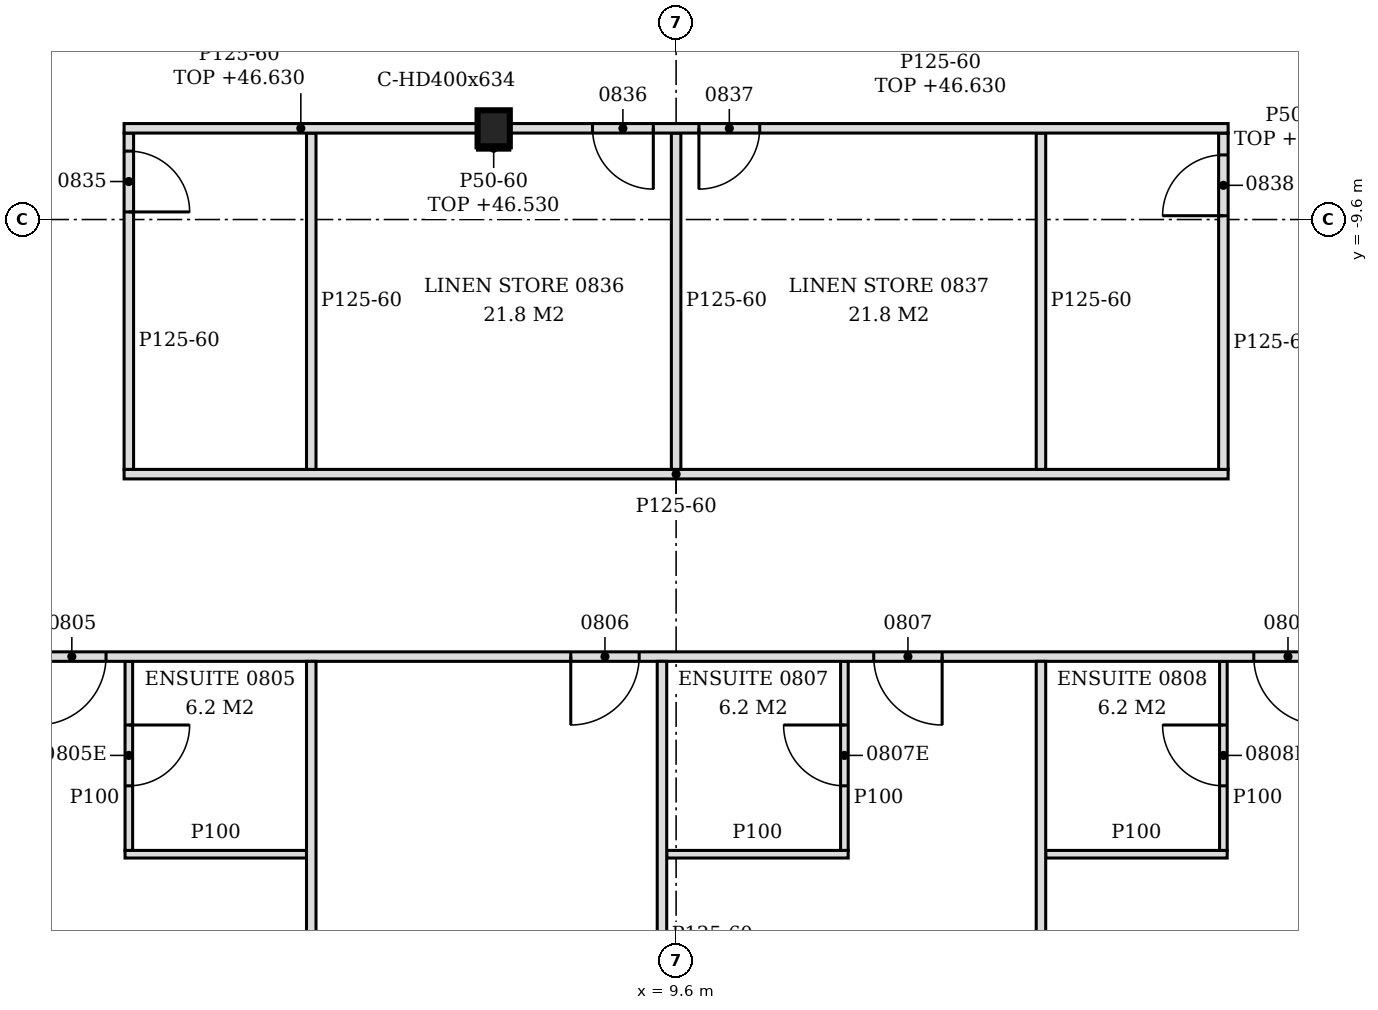
"""IFC4 building model, lengths in metres.
Left out: names, types, materials, properties, quantities, classifications, styles, units other than length and angle.
Written with IfcOpenShell. Run it as: python <this file> out.ifc"""

import sys

from ifc_helpers import new_model, si_unit, direction, frame, frame_2d, origin, origin_2d, place, context, subcontext, project, spatial, polyline, rectangle, i_section, outline, extrude, element, fill, save


model = new_model("IFC4")
c1 = context("Model", 3, precision=1e-05, world=origin(), true_north=direction((0.0, 1.0)))
c2 = subcontext(c1, "Body", "Model", "MODEL_VIEW")
j1 = project(units=[si_unit("LENGTHUNIT", "METRE"), si_unit("PLANEANGLEUNIT", "RADIAN")], contexts=[c1])
p1 = place(None, origin())
s1 = spatial("IfcSite", under=j1, at=p1, CompositionType="ELEMENT")
p2 = place(p1, origin())
s2 = spatial("IfcBuilding", under=s1, at=p2, CompositionType="ELEMENT")
p3 = place(p2, frame((0.0, 0.0, 43.8)))
s3 = spatial("IfcBuildingStorey", under=s2, at=p3, CompositionType="ELEMENT", Elevation=43.8)
p4 = place(p3, frame((7.2, -8.4, -0.15), z_axis=(0.0, 0.0, 1.0), x_axis=(1.0, 0.0, 0.0)))
e1 = element("IfcColumn", 1, at=p4, inside=s3, PredefinedType="COLUMN", context=c2, shape_type="SweptSolid", body=[
    extrude(i_section(OverallWidth=0.424, OverallDepth=0.474, WebThickness=0.048, FlangeThickness=0.077, FilletRadius=0.015, at=origin_2d()), origin(), (0.0, 0.0, 1.0), 3.6),
])
for number, where, z_axis, x_axis in (
    (2, (4.8, -23.65, 0.0), (0.0, 0.0, 1.0), (0.0, 1.0, 0.0)),
    (3, (14.4, -23.65, 0.0), (0.0, 0.0, 1.0), (0.0, 1.0, 0.0)),
):
    element("IfcWall", number, at=place(p3, frame(where, z_axis=z_axis, x_axis=x_axis)), inside=s3, PredefinedType="PARTITIONING", context=c2, shape_type="SweptSolid", body=[
        extrude(outline(polyline([(0.0, 0.0), (8.237, 0.0), (8.238, 3.45), (4.555, 3.45), (4.553, 2.88), (4.345, 2.88), (4.343, 3.45), (0.7, 3.45), (0.698, 2.93), (0.4, 2.93), (0.398, 3.45), (0.0, 3.45), (0.0, 0.0)])), frame((0.0, 0.062, 0.0), z_axis=(0.0, -1.0, 0.0), x_axis=(1.0, 0.0, 0.0)), (0.0, 0.0, 1.0), 0.125),
    ])
p5 = place(p3, frame((9.414, -22.6, 0.0), z_axis=(0.0, 0.0, 1.0), x_axis=(0.0, 1.0, 0.0)))
e4 = element("IfcWall", 4, at=p5, inside=s3, PredefinedType="PARTITIONING", context=c2, shape_type="SweptSolid", body=[
    extrude(outline(polyline([(0.0, 0.0), (7.188, 0.0), (7.188, 3.45), (3.505, 3.45), (3.503, 2.88), (3.295, 2.88), (3.293, 3.45), (0.0, 3.45), (0.0, 0.0)])), frame((0.0, 0.062, 0.0), z_axis=(0.0, -1.0, 0.0), x_axis=(1.0, 0.0, 0.0)), (0.0, 0.0, 1.0), 0.125),
])
p6 = place(p3, frame((2.35, -17.95, 0.0), z_axis=(0.0, 0.0, 1.0), x_axis=(1.0, 0.0, 0.0)))
e5 = element("IfcWall", 5, at=p6, inside=s3, PredefinedType="PARTITIONING", context=c2, shape_type="SweptSolid", body=[
    extrude(rectangle(XDim=2.387, YDim=0.1, at=frame_2d((1.194, 0.0))), origin(), (0.0, 0.0, 1.0), 3.45),
])
p7 = place(p3, frame((2.4, -17.9, 0.0), z_axis=(0.0, 0.0, 1.0), x_axis=(0.0, 1.0, 0.0)))
e6 = element("IfcWall", 6, at=p7, inside=s3, PredefinedType="PARTITIONING", context=c2, shape_type="SweptSolid", body=[
    extrude(rectangle(XDim=2.487, YDim=0.1, at=frame_2d((1.244, 0.0))), origin(), (0.0, 0.0, 1.0), 3.45),
])
p8 = place(p7, frame((0.85, 0.0, 0.0)))
e7 = element("IfcOpeningElement", 7, at=p8, cuts=e6, PredefinedType="OPENING", context=c2, shape_type="SweptSolid", body=[
    extrude(rectangle(XDim=0.8, YDim=2.1, at=frame_2d((0.4, 1.05))), frame((0.0, 0.06, 0.0), z_axis=(0.0, -1.0, 0.0), x_axis=(1.0, 0.0, 0.0)), (0.0, 0.0, 1.0), 0.12),
])
p9 = place(p3, frame((9.477, -17.95, 0.0), z_axis=(0.0, 0.0, 1.0), x_axis=(1.0, 0.0, 0.0)))
e8 = element("IfcWall", 8, at=p9, inside=s3, PredefinedType="PARTITIONING", context=c2, shape_type="SweptSolid", body=[
    extrude(rectangle(XDim=2.387, YDim=0.1, at=frame_2d((1.194, 0.0))), origin(), (0.0, 0.0, 1.0), 3.45),
])
p10 = place(p3, frame((11.814, -17.9, 0.0), z_axis=(0.0, 0.0, 1.0), x_axis=(0.0, 1.0, 0.0)))
e9 = element("IfcWall", 9, at=p10, inside=s3, PredefinedType="PARTITIONING", context=c2, shape_type="SweptSolid", body=[
    extrude(rectangle(XDim=2.487, YDim=0.1, at=frame_2d((1.244, 0.0))), origin(), (0.0, 0.0, 1.0), 3.45),
])
p11 = place(p10, frame((0.85, 0.0, 0.0)))
e10 = element("IfcOpeningElement", 10, at=p11, cuts=e9, PredefinedType="OPENING", context=c2, shape_type="SweptSolid", body=[
    extrude(rectangle(XDim=0.8, YDim=2.1, at=frame_2d((0.4, 1.05))), frame((0.0, 0.06, 0.0), z_axis=(0.0, -1.0, 0.0), x_axis=(1.0, 0.0, 0.0)), (0.0, 0.0, 1.0), 0.12),
])
p12 = place(p3, frame((14.462, -17.95, 0.0), z_axis=(0.0, 0.0, 1.0), x_axis=(1.0, 0.0, 0.0)))
e11 = element("IfcWall", 11, at=p12, inside=s3, PredefinedType="PARTITIONING", context=c2, shape_type="SweptSolid", body=[
    extrude(rectangle(XDim=2.388, YDim=0.1, at=frame_2d((1.194, 0.0))), origin(), (0.0, 0.0, 1.0), 3.45),
])
p13 = place(p3, frame((16.8, -17.9, 0.0), z_axis=(0.0, 0.0, 1.0), x_axis=(0.0, 1.0, 0.0)))
e12 = element("IfcWall", 12, at=p13, inside=s3, PredefinedType="PARTITIONING", context=c2, shape_type="SweptSolid", body=[
    extrude(rectangle(XDim=2.487, YDim=0.1, at=frame_2d((1.244, 0.0))), origin(), (0.0, 0.0, 1.0), 3.45),
])
p14 = place(p13, frame((0.85, 0.0, 0.0)))
e13 = element("IfcOpeningElement", 13, at=p14, cuts=e12, PredefinedType="OPENING", context=c2, shape_type="SweptSolid", body=[
    extrude(rectangle(XDim=0.8, YDim=2.1, at=frame_2d((0.4, 1.05))), frame((0.0, 0.06, 0.0), z_axis=(0.0, -1.0, 0.0), x_axis=(1.0, 0.0, 0.0)), (0.0, 0.0, 1.0), 0.12),
])
p15 = place(p3, frame((-20.15, -15.35, 0.0), z_axis=(0.0, 0.0, 1.0), x_axis=(1.0, 0.0, 0.0)))
e14 = element("IfcWall", 14, at=p15, inside=s3, PredefinedType="PARTITIONING", context=c2, shape_type="SweptSolid", body=[
    extrude(outline(polyline([(0.0, 0.0), (39.287, 0.0), (39.288, 2.73), (39.2, 2.73), (39.198, 3.45), (27.5, 3.45), (27.498, 2.73), (27.2, 2.73), (27.198, 3.45), (15.5, 3.45), (15.498, 2.73), (15.2, 2.73), (15.198, 3.45), (5.9, 3.45), (5.898, 2.93), (5.6, 2.93), (5.598, 3.45), (0.0, 3.45), (0.0, 0.0)])), frame((0.0, 0.062, 0.0), z_axis=(0.0, -1.0, 0.0), x_axis=(1.0, 0.0, 0.0)), (0.0, 0.0, 1.0), 0.125),
])
p16 = place(p15, frame((4.55, 0.0, 0.0)))
e15 = element("IfcOpeningElement", 15, at=p16, cuts=e14, PredefinedType="OPENING", context=c2, shape_type="SweptSolid", body=[
    extrude(rectangle(XDim=0.9, YDim=2.1, at=frame_2d((0.45, 1.05))), frame((0.0, 0.073, 0.0), z_axis=(0.0, -1.0, 0.0), x_axis=(1.0, 0.0, 0.0)), (0.0, 0.0, 1.0), 0.145),
])
p17 = place(p15, frame((7.136, 0.0, 0.0)))
e16 = element("IfcOpeningElement", 16, at=p17, cuts=e14, PredefinedType="OPENING", context=c2, shape_type="SweptSolid", body=[
    extrude(rectangle(XDim=0.9, YDim=2.1, at=frame_2d((0.45, 1.05))), frame((0.0, 0.073, 0.0), z_axis=(0.0, -1.0, 0.0), x_axis=(1.0, 0.0, 0.0)), (0.0, 0.0, 1.0), 0.145),
])
p18 = place(p15, frame((14.15, 0.0, 0.0)))
e17 = element("IfcOpeningElement", 17, at=p18, cuts=e14, PredefinedType="OPENING", context=c2, shape_type="SweptSolid", body=[
    extrude(rectangle(XDim=0.9, YDim=2.1, at=frame_2d((0.45, 1.05))), frame((0.0, 0.073, 0.0), z_axis=(0.0, -1.0, 0.0), x_axis=(1.0, 0.0, 0.0)), (0.0, 0.0, 1.0), 0.145),
])
p19 = place(p15, frame((16.55, 0.0, 0.0)))
e18 = element("IfcOpeningElement", 18, at=p19, cuts=e14, PredefinedType="OPENING", context=c2, shape_type="SweptSolid", body=[
    extrude(rectangle(XDim=0.9, YDim=2.1, at=frame_2d((0.45, 1.05))), frame((0.0, 0.073, 0.0), z_axis=(0.0, -1.0, 0.0), x_axis=(1.0, 0.0, 0.0)), (0.0, 0.0, 1.0), 0.145),
])
p20 = place(p15, frame((21.35, 0.0, 0.0)))
e19 = element("IfcOpeningElement", 19, at=p20, cuts=e14, PredefinedType="OPENING", context=c2, shape_type="SweptSolid", body=[
    extrude(rectangle(XDim=0.9, YDim=2.1, at=frame_2d((0.45, 1.05))), frame((0.0, 0.073, 0.0), z_axis=(0.0, -1.0, 0.0), x_axis=(1.0, 0.0, 0.0)), (0.0, 0.0, 1.0), 0.145),
])
p21 = place(p15, frame((28.364, 0.0, 0.0)))
e20 = element("IfcOpeningElement", 20, at=p21, cuts=e14, PredefinedType="OPENING", context=c2, shape_type="SweptSolid", body=[
    extrude(rectangle(XDim=0.9, YDim=2.1, at=frame_2d((0.45, 1.05))), frame((0.0, 0.073, 0.0), z_axis=(0.0, -1.0, 0.0), x_axis=(1.0, 0.0, 0.0)), (0.0, 0.0, 1.0), 0.145),
])
p22 = place(p15, frame((32.35, 0.0, 0.0)))
e21 = element("IfcOpeningElement", 21, at=p22, cuts=e14, PredefinedType="OPENING", context=c2, shape_type="SweptSolid", body=[
    extrude(rectangle(XDim=0.9, YDim=2.1, at=frame_2d((0.45, 1.05))), frame((0.0, 0.073, 0.0), z_axis=(0.0, -1.0, 0.0), x_axis=(1.0, 0.0, 0.0)), (0.0, 0.0, 1.0), 0.145),
])
p23 = place(p15, frame((37.35, 0.0, 0.0)))
e22 = element("IfcOpeningElement", 22, at=p23, cuts=e14, PredefinedType="OPENING", context=c2, shape_type="SweptSolid", body=[
    extrude(rectangle(XDim=0.9, YDim=2.1, at=frame_2d((0.45, 1.05))), frame((0.0, 0.073, 0.0), z_axis=(0.0, -1.0, 0.0), x_axis=(1.0, 0.0, 0.0)), (0.0, 0.0, 1.0), 0.145),
])
p24 = place(p3, frame((2.337, -12.95, 0.0), z_axis=(0.0, 0.0, 1.0), x_axis=(1.0, 0.0, 0.0)))
e23 = element("IfcWall", 23, at=p24, inside=s3, PredefinedType="PARTITIONING", context=c2, shape_type="SweptSolid", body=[
    extrude(outline(polyline([(0.0, 0.0), (14.525, 0.0), (14.525, 3.45), (5.012, 3.45), (5.01, 2.73), (4.712, 2.73), (4.71, 3.45), (0.0, 3.45), (0.0, 0.0)])), frame((0.0, 0.062, 0.0), z_axis=(0.0, -1.0, 0.0), x_axis=(1.0, 0.0, 0.0)), (0.0, 0.0, 1.0), 0.125),
])
p25 = place(p3, frame((2.4, -12.887, 0.0), z_axis=(0.0, 0.0, 1.0), x_axis=(0.0, 1.0, 0.0)))
e24 = element("IfcWall", 24, at=p25, inside=s3, PredefinedType="PARTITIONING", context=c2, shape_type="SweptSolid", body=[
    extrude(outline(polyline([(0.0, 0.0), (4.425, 0.0), (4.425, 2.83), (4.337, 2.83), (4.335, 3.45), (0.0, 3.45), (0.0, 0.0)])), frame((0.0, 0.062, 0.0), z_axis=(0.0, -1.0, 0.0), x_axis=(1.0, 0.0, 0.0)), (0.0, 0.0, 1.0), 0.125),
])
p26 = place(p25, frame((3.387, 0.0, 0.0)))
e25 = element("IfcOpeningElement", 25, at=p26, cuts=e24, PredefinedType="OPENING", context=c2, shape_type="SweptSolid", body=[
    extrude(rectangle(XDim=0.8, YDim=2.1, at=frame_2d((0.4, 1.05))), frame((0.0, 0.073, 0.0), z_axis=(0.0, -1.0, 0.0), x_axis=(1.0, 0.0, 0.0)), (0.0, 0.0, 1.0), 0.145),
])
for number, where, z_axis, x_axis in (
    (26, (4.8, -12.887, 0.0), (0.0, 0.0, 1.0), (0.0, 1.0, 0.0)),
    (27, (9.6, -12.887, 0.0), (0.0, 0.0, 1.0), (0.0, 1.0, 0.0)),
    (28, (14.4, -12.887, 0.0), (0.0, 0.0, 1.0), (0.0, 1.0, 0.0)),
):
    element("IfcWall", number, at=place(p3, frame(where, z_axis=z_axis, x_axis=x_axis)), inside=s3, PredefinedType="PARTITIONING", context=c2, shape_type="SweptSolid", body=[
        extrude(outline(polyline([(0.0, 0.0), (4.425, 0.0), (4.425, 2.83), (4.337, 2.83), (4.335, 3.45), (0.0, 3.45), (0.0, 0.0)])), frame((0.0, 0.062, 0.0), z_axis=(0.0, -1.0, 0.0), x_axis=(1.0, 0.0, 0.0)), (0.0, 0.0, 1.0), 0.125),
    ])
p27 = place(p3, frame((16.8, -12.887, 0.0), z_axis=(0.0, 0.0, 1.0), x_axis=(0.0, 1.0, 0.0)))
e29 = element("IfcWall", 29, at=p27, inside=s3, PredefinedType="PARTITIONING", context=c2, shape_type="SweptSolid", body=[
    extrude(outline(polyline([(0.0, 0.0), (4.425, 0.0), (4.425, 2.83), (4.337, 2.83), (4.335, 3.45), (0.0, 3.45), (0.0, 0.0)])), frame((0.0, 0.062, 0.0), z_axis=(0.0, -1.0, 0.0), x_axis=(1.0, 0.0, 0.0)), (0.0, 0.0, 1.0), 0.125),
])
p28 = place(p27, frame((3.337, 0.0, 0.0)))
e30 = element("IfcOpeningElement", 30, at=p28, cuts=e29, PredefinedType="OPENING", context=c2, shape_type="SweptSolid", body=[
    extrude(rectangle(XDim=0.8, YDim=2.1, at=frame_2d((0.4, 1.05))), frame((0.0, 0.073, 0.0), z_axis=(0.0, -1.0, 0.0), x_axis=(1.0, 0.0, 0.0)), (0.0, 0.0, 1.0), 0.145),
])
p29 = place(p3, frame((2.337, -8.4, 0.0), z_axis=(0.0, 0.0, 1.0), x_axis=(1.0, 0.0, 0.0)))
e31 = element("IfcWall", 31, at=p29, inside=s3, PredefinedType="PARTITIONING", context=c2, shape_type="SweptSolid", body=[
    extrude(rectangle(XDim=4.651, YDim=0.125, at=frame_2d((2.325, 0.0))), origin(), (0.0, 0.0, 1.0), 2.83),
])
p30 = place(p3, frame((7.412, -8.4, 0.0), z_axis=(0.0, 0.0, 1.0), x_axis=(1.0, 0.0, 0.0)))
e32 = element("IfcWall", 32, at=p30, inside=s3, PredefinedType="PARTITIONING", context=c2, shape_type="SweptSolid", body=[
    extrude(rectangle(XDim=9.45, YDim=0.125, at=frame_2d((4.725, 0.0))), origin(), (0.0, 0.0, 1.0), 2.83),
])
p31 = place(p30, frame((1.088, 0.0, 0.0)))
e33 = element("IfcOpeningElement", 33, at=p31, cuts=e32, PredefinedType="OPENING", context=c2, shape_type="SweptSolid", body=[
    extrude(rectangle(XDim=0.8, YDim=2.1, at=frame_2d((0.4, 1.05))), frame((0.0, 0.073, 0.0), z_axis=(0.0, -1.0, 0.0), x_axis=(1.0, 0.0, 0.0)), (0.0, 0.0, 1.0), 0.145),
])
p32 = place(p30, frame((2.488, 0.0, 0.0)))
e34 = element("IfcOpeningElement", 34, at=p32, cuts=e32, PredefinedType="OPENING", context=c2, shape_type="SweptSolid", body=[
    extrude(rectangle(XDim=0.8, YDim=2.1, at=frame_2d((0.4, 1.05))), frame((0.0, 0.073, 0.0), z_axis=(0.0, -1.0, 0.0), x_axis=(1.0, 0.0, 0.0)), (0.0, 0.0, 1.0), 0.145),
])
p33 = place(p3, frame((6.988, -8.662, 0.0), z_axis=(0.0, 0.0, 1.0), x_axis=(1.0, 0.0, 0.0)))
e35 = element("IfcWall", 35, at=p33, inside=s3, PredefinedType="PARTITIONING", context=c2, shape_type="SweptSolid", body=[
    extrude(rectangle(XDim=0.424, YDim=0.05, at=frame_2d((0.212, 0.0))), origin(), (0.0, 0.0, 1.0), 2.73),
])
p34 = place(p20, frame((0.9, 0.0, 0.0), z_axis=(0.0, 0.0, 1.0), x_axis=(-1.0, 0.0, 0.0)))
e36 = element("IfcDoor", 36, at=p34, inside=s3, OperationType="SINGLE_SWING_RIGHT", PredefinedType="DOOR", context=c2, shape_type="SweptSolid", body=[
    extrude(rectangle(XDim=0.9, YDim=2.1, at=frame_2d((0.45, 1.05))), frame((0.0, 0.025, 0.0), z_axis=(0.0, -1.0, 0.0), x_axis=(1.0, 0.0, 0.0)), (0.0, 0.0, 1.0), 0.05),
])
fill(e19, e36)
p35 = place(p8, frame((0.8, 0.0, 0.0), z_axis=(0.0, 0.0, 1.0), x_axis=(-1.0, 0.0, 0.0)))
e37 = element("IfcDoor", 37, at=p35, inside=s3, OperationType="SINGLE_SWING_LEFT", PredefinedType="DOOR", context=c2, shape_type="SweptSolid", body=[
    extrude(rectangle(XDim=0.8, YDim=2.1, at=frame_2d((0.4, 1.05))), frame((0.0, 0.025, 0.0), z_axis=(0.0, -1.0, 0.0), x_axis=(1.0, 0.0, 0.0)), (0.0, 0.0, 1.0), 0.05),
])
fill(e7, e37)
p36 = place(p21, frame((0.9, 0.0, 0.0), z_axis=(0.0, 0.0, 1.0), x_axis=(-1.0, 0.0, 0.0)))
e38 = element("IfcDoor", 38, at=p36, inside=s3, OperationType="SINGLE_SWING_RIGHT", PredefinedType="DOOR", context=c2, shape_type="SweptSolid", body=[
    extrude(rectangle(XDim=0.9, YDim=2.1, at=frame_2d((0.45, 1.05))), frame((0.0, 0.025, 0.0), z_axis=(0.0, -1.0, 0.0), x_axis=(1.0, 0.0, 0.0)), (0.0, 0.0, 1.0), 0.05),
])
fill(e20, e38)
p37 = place(p22, frame((0.9, 0.0, 0.0), z_axis=(0.0, 0.0, 1.0), x_axis=(-1.0, 0.0, 0.0)))
e39 = element("IfcDoor", 39, at=p37, inside=s3, OperationType="SINGLE_SWING_LEFT", PredefinedType="DOOR", context=c2, shape_type="SweptSolid", body=[
    extrude(rectangle(XDim=0.9, YDim=2.1, at=frame_2d((0.45, 1.05))), frame((0.0, 0.025, 0.0), z_axis=(0.0, -1.0, 0.0), x_axis=(1.0, 0.0, 0.0)), (0.0, 0.0, 1.0), 0.05),
])
fill(e21, e39)
p38 = place(p11, origin())
e40 = element("IfcDoor", 40, at=p38, inside=s3, OperationType="SINGLE_SWING_RIGHT", PredefinedType="DOOR", context=c2, shape_type="SweptSolid", body=[
    extrude(rectangle(XDim=0.8, YDim=2.1, at=frame_2d((0.4, 1.05))), frame((0.0, 0.025, 0.0), z_axis=(0.0, -1.0, 0.0), x_axis=(1.0, 0.0, 0.0)), (0.0, 0.0, 1.0), 0.05),
])
fill(e10, e40)
p39 = place(p23, frame((0.9, 0.0, 0.0), z_axis=(0.0, 0.0, 1.0), x_axis=(-1.0, 0.0, 0.0)))
e41 = element("IfcDoor", 41, at=p39, inside=s3, OperationType="SINGLE_SWING_LEFT", PredefinedType="DOOR", context=c2, shape_type="SweptSolid", body=[
    extrude(rectangle(XDim=0.9, YDim=2.1, at=frame_2d((0.45, 1.05))), frame((0.0, 0.025, 0.0), z_axis=(0.0, -1.0, 0.0), x_axis=(1.0, 0.0, 0.0)), (0.0, 0.0, 1.0), 0.05),
])
fill(e22, e41)
p40 = place(p14, origin())
e42 = element("IfcDoor", 42, at=p40, inside=s3, OperationType="SINGLE_SWING_RIGHT", PredefinedType="DOOR", context=c2, shape_type="SweptSolid", body=[
    extrude(rectangle(XDim=0.8, YDim=2.1, at=frame_2d((0.4, 1.05))), frame((0.0, 0.025, 0.0), z_axis=(0.0, -1.0, 0.0), x_axis=(1.0, 0.0, 0.0)), (0.0, 0.0, 1.0), 0.05),
])
fill(e13, e42)
p41 = place(p26, frame((0.8, 0.0, 0.0), z_axis=(0.0, 0.0, 1.0), x_axis=(-1.0, 0.0, 0.0)))
e43 = element("IfcDoor", 43, at=p41, inside=s3, OperationType="SINGLE_SWING_RIGHT", PredefinedType="DOOR", context=c2, shape_type="SweptSolid", body=[
    extrude(rectangle(XDim=0.8, YDim=2.1, at=frame_2d((0.4, 1.05))), frame((0.0, 0.025, 0.0), z_axis=(0.0, -1.0, 0.0), x_axis=(1.0, 0.0, 0.0)), (0.0, 0.0, 1.0), 0.05),
])
fill(e25, e43)
p42 = place(p31, frame((0.8, 0.0, 0.0), z_axis=(0.0, 0.0, 1.0), x_axis=(-1.0, 0.0, 0.0)))
e44 = element("IfcDoor", 44, at=p42, inside=s3, OperationType="SINGLE_SWING_LEFT", PredefinedType="DOOR", context=c2, shape_type="SweptSolid", body=[
    extrude(rectangle(XDim=0.8, YDim=2.1, at=frame_2d((0.4, 1.05))), frame((0.0, 0.025, 0.0), z_axis=(0.0, -1.0, 0.0), x_axis=(1.0, 0.0, 0.0)), (0.0, 0.0, 1.0), 0.05),
])
fill(e33, e44)
p43 = place(p32, frame((0.8, 0.0, 0.0), z_axis=(0.0, 0.0, 1.0), x_axis=(-1.0, 0.0, 0.0)))
e45 = element("IfcDoor", 45, at=p43, inside=s3, OperationType="SINGLE_SWING_RIGHT", PredefinedType="DOOR", context=c2, shape_type="SweptSolid", body=[
    extrude(rectangle(XDim=0.8, YDim=2.1, at=frame_2d((0.4, 1.05))), frame((0.0, 0.025, 0.0), z_axis=(0.0, -1.0, 0.0), x_axis=(1.0, 0.0, 0.0)), (0.0, 0.0, 1.0), 0.05),
])
fill(e34, e45)
p44 = place(p28, origin())
e46 = element("IfcDoor", 46, at=p44, inside=s3, OperationType="SINGLE_SWING_LEFT", PredefinedType="DOOR", context=c2, shape_type="SweptSolid", body=[
    extrude(rectangle(XDim=0.8, YDim=2.1, at=frame_2d((0.4, 1.05))), frame((0.0, 0.025, 0.0), z_axis=(0.0, -1.0, 0.0), x_axis=(1.0, 0.0, 0.0)), (0.0, 0.0, 1.0), 0.05),
])
fill(e30, e46)
save(model, sys.argv[1])
